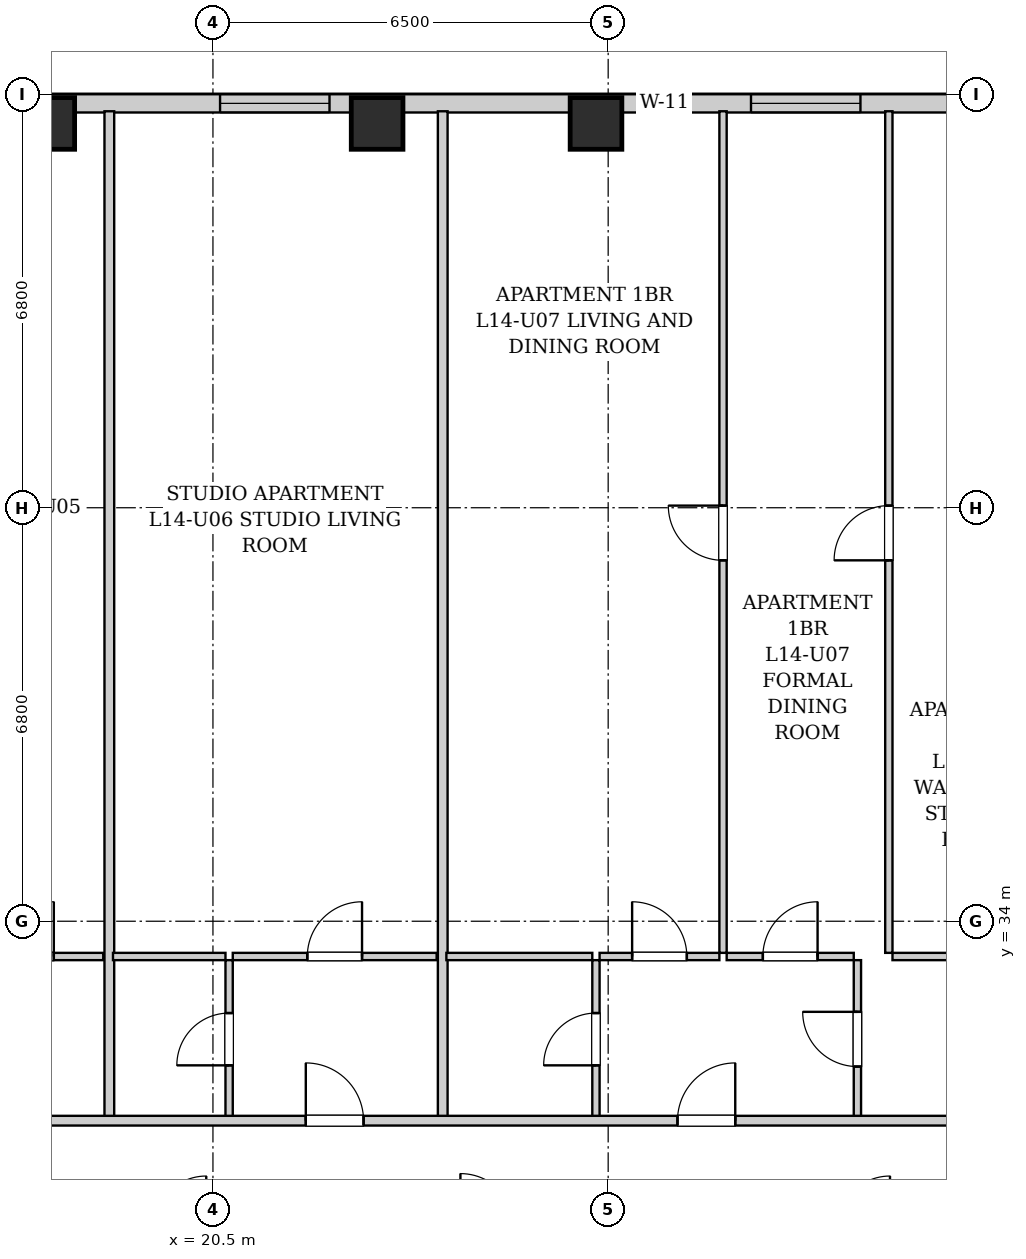
"""IFC4 building model, lengths in metres.
Left out: names, types, materials, properties, quantities, classifications, styles, units other than length and angle.
Written with IfcOpenShell. Run it as: python <this file> out.ifc"""

import sys

from ifc_helpers import new_model, si_unit, direction, frame, frame_2d, origin, origin_2d, place, context, subcontext, project, spatial, rectangle, extrude, element, fill, save


model = new_model("IFC4")
c1 = context("Model", 3, precision=1e-05, world=origin(), true_north=direction((0.0, 1.0)))
c2 = subcontext(c1, "Body", "Model", "MODEL_VIEW")
j1 = project(units=[si_unit("LENGTHUNIT", "METRE"), si_unit("PLANEANGLEUNIT", "RADIAN")], contexts=[c1])
p1 = place(None, origin())
s1 = spatial("IfcSite", under=j1, at=p1, CompositionType="ELEMENT")
p2 = place(p1, origin())
s2 = spatial("IfcBuilding", under=s1, at=p2, CompositionType="ELEMENT")
p3 = place(p2, frame((0.0, 0.0, 54.6)))
s3 = spatial("IfcBuildingStorey", under=s2, at=p3, CompositionType="ELEMENT", Elevation=54.6)
for number, where, z_axis, x_axis in (
    (1, (17.8, 47.12, 0.0), (0.0, 0.0, 1.0), (1.0, 0.0, 0.0)),
    (2, (23.2, 47.12, 0.0), (0.0, 0.0, 1.0), (1.0, 0.0, 0.0)),
    (3, (26.8, 47.12, 0.0), (0.0, 0.0, 1.0), (1.0, 0.0, 0.0)),
):
    element("IfcColumn", number, at=place(p3, frame(where, z_axis=z_axis, x_axis=x_axis)), inside=s3, PredefinedType="COLUMN", context=c2, shape_type="SweptSolid", body=[
        extrude(rectangle(XDim=0.85, YDim=0.85, at=origin_2d()), origin(), (0.0, 0.0, 1.0), 3.2),
    ])
p4 = place(p3, frame((10.0, 47.45, 0.0), z_axis=(0.0, 0.0, 1.0), x_axis=(1.0, 0.0, 0.0)))
e4 = element("IfcWall", 4, at=p4, inside=s3, PredefinedType="SOLIDWALL", context=c2, shape_type="SweptSolid", body=[
    extrude(rectangle(XDim=27.55, YDim=0.3, at=frame_2d((13.775, 0.0))), origin(), (0.0, 0.0, 1.0), 1.975),
])
p5 = place(p4, frame((1.735, 0.0, 0.55)))
e5 = element("IfcOpeningElement", 5, at=p5, cuts=e4, PredefinedType="OPENING", context=c2, shape_type="SweptSolid", body=[
    extrude(rectangle(XDim=1.8, YDim=1.2, at=frame_2d((0.9, 0.6))), frame((0.0, 0.16, 0.0), z_axis=(0.0, -1.0, 0.0), x_axis=(1.0, 0.0, 0.0)), (0.0, 0.0, 1.0), 0.32),
])
p6 = place(p4, frame((5.415, 0.0, 0.55)))
e6 = element("IfcOpeningElement", 6, at=p6, cuts=e4, PredefinedType="OPENING", context=c2, shape_type="SweptSolid", body=[
    extrude(rectangle(XDim=1.8, YDim=1.2, at=frame_2d((0.9, 0.6))), frame((0.0, 0.16, 0.0), z_axis=(0.0, -1.0, 0.0), x_axis=(1.0, 0.0, 0.0)), (0.0, 0.0, 1.0), 0.32),
])
p7 = place(p4, frame((10.617, 0.0, 0.55)))
e7 = element("IfcOpeningElement", 7, at=p7, cuts=e4, PredefinedType="OPENING", context=c2, shape_type="SweptSolid", body=[
    extrude(rectangle(XDim=1.8, YDim=1.2, at=frame_2d((0.9, 0.6))), frame((0.0, 0.16, 0.0), z_axis=(0.0, -1.0, 0.0), x_axis=(1.0, 0.0, 0.0)), (0.0, 0.0, 1.0), 0.32),
])
p8 = place(p4, frame((17.5, 0.0, 0.55)))
e8 = element("IfcOpeningElement", 8, at=p8, cuts=e4, PredefinedType="OPENING", context=c2, shape_type="SweptSolid", body=[
    extrude(rectangle(XDim=0.85, YDim=1.2, at=frame_2d((0.425, 0.6))), frame((0.0, 0.16, 0.0), z_axis=(0.0, -1.0, 0.0), x_axis=(1.0, 0.0, 0.0)), (0.0, 0.0, 1.0), 0.32),
])
p9 = place(p4, frame((19.349, 0.0, 0.55)))
e9 = element("IfcOpeningElement", 9, at=p9, cuts=e4, PredefinedType="OPENING", context=c2, shape_type="SweptSolid", body=[
    extrude(rectangle(XDim=1.8, YDim=1.2, at=frame_2d((0.9, 0.6))), frame((0.0, 0.16, 0.0), z_axis=(0.0, -1.0, 0.0), x_axis=(1.0, 0.0, 0.0)), (0.0, 0.0, 1.0), 0.32),
])
p10 = place(p4, frame((24.769, 0.0, 0.55)))
e10 = element("IfcOpeningElement", 10, at=p10, cuts=e4, PredefinedType="OPENING", context=c2, shape_type="SweptSolid", body=[
    extrude(rectangle(XDim=1.8, YDim=1.2, at=frame_2d((0.9, 0.6))), frame((0.0, 0.16, 0.0), z_axis=(0.0, -1.0, 0.0), x_axis=(1.0, 0.0, 0.0)), (0.0, 0.0, 1.0), 0.32),
])
p11 = place(p3, frame((16.17, 33.42, 0.0), z_axis=(0.0, 0.0, 1.0), x_axis=(1.0, 0.0, 0.0)))
e11 = element("IfcWall", 11, at=p11, inside=s3, PredefinedType="PARTITIONING", context=c2, shape_type="SweptSolid", body=[
    extrude(rectangle(XDim=2.526, YDim=0.12, at=frame_2d((1.263, 0.0))), origin(), (0.0, 0.0, 1.0), 2.94),
])
p12 = place(p11, frame((0.813, 0.0, 0.0)))
e12 = element("IfcOpeningElement", 12, at=p12, cuts=e11, PredefinedType="OPENING", context=c2, shape_type="SweptSolid", body=[
    extrude(rectangle(XDim=0.9, YDim=2.05, at=frame_2d((0.45, 1.025))), frame((0.0, 0.07, 0.0), z_axis=(0.0, -1.0, 0.0), x_axis=(1.0, 0.0, 0.0)), (0.0, 0.0, 1.0), 0.14),
])
p13 = place(p3, frame((18.796, 30.76, 0.0), z_axis=(0.0, 0.0, 1.0), x_axis=(0.0, 1.0, 0.0)))
e13 = element("IfcWall", 13, at=p13, inside=s3, PredefinedType="PARTITIONING", context=c2, shape_type="SweptSolid", body=[
    extrude(rectangle(XDim=16.56, YDim=0.16, at=frame_2d((8.28, 0.0))), origin(), (0.0, 0.0, 1.0), 2.94),
])
p14 = place(p3, frame((20.766, 30.76, 0.0), z_axis=(0.0, 0.0, 1.0), x_axis=(0.0, 1.0, 0.0)))
e14 = element("IfcWall", 14, at=p14, inside=s3, PredefinedType="PARTITIONING", context=c2, shape_type="SweptSolid", body=[
    extrude(rectangle(XDim=2.6, YDim=0.12, at=frame_2d((1.3, 0.0))), origin(), (0.0, 0.0, 1.0), 2.94),
])
p15 = place(p14, frame((0.87, 0.0, 0.0)))
e15 = element("IfcOpeningElement", 15, at=p15, cuts=e14, PredefinedType="OPENING", context=c2, shape_type="SweptSolid", body=[
    extrude(rectangle(XDim=0.86, YDim=2.05, at=frame_2d((0.43, 1.025))), frame((0.0, 0.07, 0.0), z_axis=(0.0, -1.0, 0.0), x_axis=(1.0, 0.0, 0.0)), (0.0, 0.0, 1.0), 0.14),
])
p16 = place(p3, frame((18.856, 33.42, 0.0), z_axis=(0.0, 0.0, 1.0), x_axis=(1.0, 0.0, 0.0)))
e16 = element("IfcWall", 16, at=p16, inside=s3, PredefinedType="PARTITIONING", context=c2, shape_type="SweptSolid", body=[
    extrude(rectangle(XDim=1.85, YDim=0.12, at=frame_2d((0.925, 0.0))), origin(), (0.0, 0.0, 1.0), 2.94),
])
p17 = place(p3, frame((20.826, 33.42, 0.0), z_axis=(0.0, 0.0, 1.0), x_axis=(1.0, 0.0, 0.0)))
e17 = element("IfcWall", 17, at=p17, inside=s3, PredefinedType="PARTITIONING", context=c2, shape_type="SweptSolid", body=[
    extrude(rectangle(XDim=3.353, YDim=0.12, at=frame_2d((1.677, 0.0))), origin(), (0.0, 0.0, 1.0), 2.94),
])
p18 = place(p17, frame((1.226, 0.0, 0.0)))
e18 = element("IfcOpeningElement", 18, at=p18, cuts=e17, PredefinedType="OPENING", context=c2, shape_type="SweptSolid", body=[
    extrude(rectangle(XDim=0.9, YDim=2.05, at=frame_2d((0.45, 1.025))), frame((0.0, 0.07, 0.0), z_axis=(0.0, -1.0, 0.0), x_axis=(1.0, 0.0, 0.0)), (0.0, 0.0, 1.0), 0.14),
])
p19 = place(p3, frame((24.279, 30.76, 0.0), z_axis=(0.0, 0.0, 1.0), x_axis=(0.0, 1.0, 0.0)))
e19 = element("IfcWall", 19, at=p19, inside=s3, PredefinedType="PARTITIONING", context=c2, shape_type="SweptSolid", body=[
    extrude(rectangle(XDim=16.56, YDim=0.16, at=frame_2d((8.28, 0.0))), origin(), (0.0, 0.0, 1.0), 2.94),
])
p20 = place(p3, frame((26.799, 30.76, 0.0), z_axis=(0.0, 0.0, 1.0), x_axis=(0.0, 1.0, 0.0)))
e20 = element("IfcWall", 20, at=p20, inside=s3, PredefinedType="PARTITIONING", context=c2, shape_type="SweptSolid", body=[
    extrude(rectangle(XDim=2.6, YDim=0.12, at=frame_2d((1.3, 0.0))), origin(), (0.0, 0.0, 1.0), 2.94),
])
p21 = place(p20, frame((0.87, 0.0, 0.0)))
e21 = element("IfcOpeningElement", 21, at=p21, cuts=e20, PredefinedType="OPENING", context=c2, shape_type="SweptSolid", body=[
    extrude(rectangle(XDim=0.86, YDim=2.05, at=frame_2d((0.43, 1.025))), frame((0.0, 0.07, 0.0), z_axis=(0.0, -1.0, 0.0), x_axis=(1.0, 0.0, 0.0)), (0.0, 0.0, 1.0), 0.14),
])
p22 = place(p3, frame((24.339, 33.42, 0.0), z_axis=(0.0, 0.0, 1.0), x_axis=(1.0, 0.0, 0.0)))
e22 = element("IfcWall", 22, at=p22, inside=s3, PredefinedType="PARTITIONING", context=c2, shape_type="SweptSolid", body=[
    extrude(rectangle(XDim=2.4, YDim=0.12, at=frame_2d((1.2, 0.0))), origin(), (0.0, 0.0, 1.0), 2.94),
])
p23 = place(p3, frame((31.099, 30.76, 0.0), z_axis=(0.0, 0.0, 1.0), x_axis=(0.0, 1.0, 0.0)))
e23 = element("IfcWall", 23, at=p23, inside=s3, PredefinedType="PARTITIONING", context=c2, shape_type="SweptSolid", body=[
    extrude(rectangle(XDim=2.6, YDim=0.12, at=frame_2d((1.3, 0.0))), origin(), (0.0, 0.0, 1.0), 2.94),
])
p24 = place(p23, frame((0.85, 0.0, 0.0)))
e24 = element("IfcOpeningElement", 24, at=p24, cuts=e23, PredefinedType="OPENING", context=c2, shape_type="SweptSolid", body=[
    extrude(rectangle(XDim=0.9, YDim=2.05, at=frame_2d((0.45, 1.025))), frame((0.0, 0.07, 0.0), z_axis=(0.0, -1.0, 0.0), x_axis=(1.0, 0.0, 0.0)), (0.0, 0.0, 1.0), 0.14),
])
p25 = place(p3, frame((26.859, 33.42, 0.0), z_axis=(0.0, 0.0, 1.0), x_axis=(1.0, 0.0, 0.0)))
e25 = element("IfcWall", 25, at=p25, inside=s3, PredefinedType="PARTITIONING", context=c2, shape_type="SweptSolid", body=[
    extrude(rectangle(XDim=1.97, YDim=0.12, at=frame_2d((0.985, 0.0))), origin(), (0.0, 0.0, 1.0), 2.94),
])
p26 = place(p25, frame((0.535, 0.0, 0.0)))
e26 = element("IfcOpeningElement", 26, at=p26, cuts=e25, PredefinedType="OPENING", context=c2, shape_type="SweptSolid", body=[
    extrude(rectangle(XDim=0.9, YDim=2.05, at=frame_2d((0.45, 1.025))), frame((0.0, 0.07, 0.0), z_axis=(0.0, -1.0, 0.0), x_axis=(1.0, 0.0, 0.0)), (0.0, 0.0, 1.0), 0.14),
])
p27 = place(p3, frame((28.949, 33.42, 0.0), z_axis=(0.0, 0.0, 1.0), x_axis=(1.0, 0.0, 0.0)))
e27 = element("IfcWall", 27, at=p27, inside=s3, PredefinedType="PARTITIONING", context=c2, shape_type="SweptSolid", body=[
    extrude(rectangle(XDim=2.09, YDim=0.12, at=frame_2d((1.045, 0.0))), origin(), (0.0, 0.0, 1.0), 2.94),
])
p28 = place(p27, frame((0.595, 0.0, 0.0)))
e28 = element("IfcOpeningElement", 28, at=p28, cuts=e27, PredefinedType="OPENING", context=c2, shape_type="SweptSolid", body=[
    extrude(rectangle(XDim=0.9, YDim=2.05, at=frame_2d((0.45, 1.025))), frame((0.0, 0.07, 0.0), z_axis=(0.0, -1.0, 0.0), x_axis=(1.0, 0.0, 0.0)), (0.0, 0.0, 1.0), 0.14),
])
p29 = place(p3, frame((31.676, 33.42, 0.0), z_axis=(0.0, 0.0, 1.0), x_axis=(1.0, 0.0, 0.0)))
e29 = element("IfcWall", 29, at=p29, inside=s3, PredefinedType="PARTITIONING", context=c2, shape_type="SweptSolid", body=[
    extrude(rectangle(XDim=2.752, YDim=0.12, at=frame_2d((1.376, 0.0))), origin(), (0.0, 0.0, 1.0), 2.94),
])
p30 = place(p29, frame((0.926, 0.0, 0.0)))
e30 = element("IfcOpeningElement", 30, at=p30, cuts=e29, PredefinedType="OPENING", context=c2, shape_type="SweptSolid", body=[
    extrude(rectangle(XDim=0.9, YDim=2.05, at=frame_2d((0.45, 1.025))), frame((0.0, 0.07, 0.0), z_axis=(0.0, -1.0, 0.0), x_axis=(1.0, 0.0, 0.0)), (0.0, 0.0, 1.0), 0.14),
])
p31 = place(p3, frame((28.889, 33.48, 0.0), z_axis=(0.0, 0.0, 1.0), x_axis=(0.0, 1.0, 0.0)))
e31 = element("IfcWall", 31, at=p31, inside=s3, PredefinedType="PARTITIONING", context=c2, shape_type="SweptSolid", body=[
    extrude(rectangle(XDim=13.84, YDim=0.12, at=frame_2d((6.92, 0.0))), origin(), (0.0, 0.0, 1.0), 2.94),
])
p32 = place(p31, frame((6.455, 0.0, 0.0)))
e32 = element("IfcOpeningElement", 32, at=p32, cuts=e31, PredefinedType="OPENING", context=c2, shape_type="SweptSolid", body=[
    extrude(rectangle(XDim=0.9, YDim=2.05, at=frame_2d((0.45, 1.025))), frame((0.0, 0.07, 0.0), z_axis=(0.0, -1.0, 0.0), x_axis=(1.0, 0.0, 0.0)), (0.0, 0.0, 1.0), 0.14),
])
p33 = place(p3, frame((31.616, 33.48, 0.0), z_axis=(0.0, 0.0, 1.0), x_axis=(0.0, 1.0, 0.0)))
e33 = element("IfcWall", 33, at=p33, inside=s3, PredefinedType="PARTITIONING", context=c2, shape_type="SweptSolid", body=[
    extrude(rectangle(XDim=13.84, YDim=0.12, at=frame_2d((6.92, 0.0))), origin(), (0.0, 0.0, 1.0), 2.94),
])
p34 = place(p33, frame((6.455, 0.0, 0.0)))
e34 = element("IfcOpeningElement", 34, at=p34, cuts=e33, PredefinedType="OPENING", context=c2, shape_type="SweptSolid", body=[
    extrude(rectangle(XDim=0.9, YDim=2.05, at=frame_2d((0.45, 1.025))), frame((0.0, 0.07, 0.0), z_axis=(0.0, -1.0, 0.0), x_axis=(1.0, 0.0, 0.0)), (0.0, 0.0, 1.0), 0.14),
])
p35 = place(p3, frame((10.05, 30.72, 0.0), z_axis=(0.0, 0.0, 1.0), x_axis=(1.0, 0.0, 0.0)))
e35 = element("IfcWall", 35, at=p35, inside=s3, PredefinedType="PARTITIONING", context=c2, shape_type="SweptSolid", body=[
    extrude(rectangle(XDim=33.9, YDim=0.16, at=frame_2d((16.95, 0.0))), origin(), (0.0, 0.0, 1.0), 2.94),
])
p36 = place(p35, frame((3.8, 0.0, 0.0)))
e36 = element("IfcOpeningElement", 36, at=p36, cuts=e35, PredefinedType="OPENING", context=c2, shape_type="SweptSolid", body=[
    extrude(rectangle(XDim=0.95, YDim=2.1, at=frame_2d((0.475, 1.05))), frame((0.0, 0.09, 0.0), z_axis=(0.0, -1.0, 0.0), x_axis=(1.0, 0.0, 0.0)), (0.0, 0.0, 1.0), 0.18),
])
p37 = place(p35, frame((11.977, 0.0, 0.0)))
e37 = element("IfcOpeningElement", 37, at=p37, cuts=e35, PredefinedType="OPENING", context=c2, shape_type="SweptSolid", body=[
    extrude(rectangle(XDim=0.95, YDim=2.1, at=frame_2d((0.475, 1.05))), frame((0.0, 0.09, 0.0), z_axis=(0.0, -1.0, 0.0), x_axis=(1.0, 0.0, 0.0)), (0.0, 0.0, 1.0), 0.18),
])
p38 = place(p35, frame((18.09, 0.0, 0.0)))
e38 = element("IfcOpeningElement", 38, at=p38, cuts=e35, PredefinedType="OPENING", context=c2, shape_type="SweptSolid", body=[
    extrude(rectangle(XDim=0.95, YDim=2.1, at=frame_2d((0.475, 1.05))), frame((0.0, 0.09, 0.0), z_axis=(0.0, -1.0, 0.0), x_axis=(1.0, 0.0, 0.0)), (0.0, 0.0, 1.0), 0.18),
])
p39 = place(p35, frame((30.956, 0.0, 0.0)))
e39 = element("IfcOpeningElement", 39, at=p39, cuts=e35, PredefinedType="OPENING", context=c2, shape_type="SweptSolid", body=[
    extrude(rectangle(XDim=0.95, YDim=2.1, at=frame_2d((0.475, 1.05))), frame((0.0, 0.09, 0.0), z_axis=(0.0, -1.0, 0.0), x_axis=(1.0, 0.0, 0.0)), (0.0, 0.0, 1.0), 0.18),
])
p40 = place(p12, origin())
e40 = element("IfcDoor", 40, at=p40, inside=s3, OperationType="SINGLE_SWING_RIGHT", PredefinedType="DOOR", context=c2, shape_type="SweptSolid", body=[
    extrude(rectangle(XDim=0.9, YDim=2.05, at=frame_2d((0.45, 1.025))), frame((0.0, 0.025, 0.0), z_axis=(0.0, -1.0, 0.0), x_axis=(1.0, 0.0, 0.0)), (0.0, 0.0, 1.0), 0.05),
])
fill(e12, e40)
p41 = place(p15, origin())
e41 = element("IfcDoor", 41, at=p41, inside=s3, OperationType="SINGLE_SWING_LEFT", PredefinedType="DOOR", context=c2, shape_type="SweptSolid", body=[
    extrude(rectangle(XDim=0.86, YDim=2.05, at=frame_2d((0.43, 1.025))), frame((0.0, 0.025, 0.0), z_axis=(0.0, -1.0, 0.0), x_axis=(1.0, 0.0, 0.0)), (0.0, 0.0, 1.0), 0.05),
])
fill(e15, e41)
p42 = place(p18, origin())
e42 = element("IfcDoor", 42, at=p42, inside=s3, OperationType="SINGLE_SWING_RIGHT", PredefinedType="DOOR", context=c2, shape_type="SweptSolid", body=[
    extrude(rectangle(XDim=0.9, YDim=2.05, at=frame_2d((0.45, 1.025))), frame((0.0, 0.025, 0.0), z_axis=(0.0, -1.0, 0.0), x_axis=(1.0, 0.0, 0.0)), (0.0, 0.0, 1.0), 0.05),
])
fill(e18, e42)
p43 = place(p21, origin())
e43 = element("IfcDoor", 43, at=p43, inside=s3, OperationType="SINGLE_SWING_LEFT", PredefinedType="DOOR", context=c2, shape_type="SweptSolid", body=[
    extrude(rectangle(XDim=0.86, YDim=2.05, at=frame_2d((0.43, 1.025))), frame((0.0, 0.025, 0.0), z_axis=(0.0, -1.0, 0.0), x_axis=(1.0, 0.0, 0.0)), (0.0, 0.0, 1.0), 0.05),
])
fill(e21, e43)
p44 = place(p24, origin())
e44 = element("IfcDoor", 44, at=p44, inside=s3, OperationType="SINGLE_SWING_RIGHT", PredefinedType="DOOR", context=c2, shape_type="SweptSolid", body=[
    extrude(rectangle(XDim=0.9, YDim=2.05, at=frame_2d((0.45, 1.025))), frame((0.0, 0.025, 0.0), z_axis=(0.0, -1.0, 0.0), x_axis=(1.0, 0.0, 0.0)), (0.0, 0.0, 1.0), 0.05),
])
fill(e24, e44)
p45 = place(p26, origin())
e45 = element("IfcDoor", 45, at=p45, inside=s3, OperationType="SINGLE_SWING_LEFT", PredefinedType="DOOR", context=c2, shape_type="SweptSolid", body=[
    extrude(rectangle(XDim=0.9, YDim=2.05, at=frame_2d((0.45, 1.025))), frame((0.0, 0.025, 0.0), z_axis=(0.0, -1.0, 0.0), x_axis=(1.0, 0.0, 0.0)), (0.0, 0.0, 1.0), 0.05),
])
fill(e26, e45)
p46 = place(p28, origin())
e46 = element("IfcDoor", 46, at=p46, inside=s3, OperationType="SINGLE_SWING_RIGHT", PredefinedType="DOOR", context=c2, shape_type="SweptSolid", body=[
    extrude(rectangle(XDim=0.9, YDim=2.05, at=frame_2d((0.45, 1.025))), frame((0.0, 0.025, 0.0), z_axis=(0.0, -1.0, 0.0), x_axis=(1.0, 0.0, 0.0)), (0.0, 0.0, 1.0), 0.05),
])
fill(e28, e46)
p47 = place(p32, origin())
e47 = element("IfcDoor", 47, at=p47, inside=s3, OperationType="SINGLE_SWING_RIGHT", PredefinedType="DOOR", context=c2, shape_type="SweptSolid", body=[
    extrude(rectangle(XDim=0.9, YDim=2.05, at=frame_2d((0.45, 1.025))), frame((0.0, 0.025, 0.0), z_axis=(0.0, -1.0, 0.0), x_axis=(1.0, 0.0, 0.0)), (0.0, 0.0, 1.0), 0.05),
])
fill(e32, e47)
p48 = place(p34, origin())
e48 = element("IfcDoor", 48, at=p48, inside=s3, OperationType="SINGLE_SWING_LEFT", PredefinedType="DOOR", context=c2, shape_type="SweptSolid", body=[
    extrude(rectangle(XDim=0.9, YDim=2.05, at=frame_2d((0.45, 1.025))), frame((0.0, 0.025, 0.0), z_axis=(0.0, -1.0, 0.0), x_axis=(1.0, 0.0, 0.0)), (0.0, 0.0, 1.0), 0.05),
])
fill(e34, e48)
p49 = place(p37, origin())
e49 = element("IfcDoor", 49, at=p49, inside=s3, OperationType="SINGLE_SWING_LEFT", PredefinedType="DOOR", context=c2, shape_type="SweptSolid", body=[
    extrude(rectangle(XDim=0.95, YDim=2.1, at=frame_2d((0.475, 1.05))), frame((0.0, 0.025, 0.0), z_axis=(0.0, -1.0, 0.0), x_axis=(1.0, 0.0, 0.0)), (0.0, 0.0, 1.0), 0.05),
])
fill(e37, e49)
p50 = place(p38, origin())
e50 = element("IfcDoor", 50, at=p50, inside=s3, OperationType="SINGLE_SWING_RIGHT", PredefinedType="DOOR", context=c2, shape_type="SweptSolid", body=[
    extrude(rectangle(XDim=0.95, YDim=2.1, at=frame_2d((0.475, 1.05))), frame((0.0, 0.025, 0.0), z_axis=(0.0, -1.0, 0.0), x_axis=(1.0, 0.0, 0.0)), (0.0, 0.0, 1.0), 0.05),
])
fill(e38, e50)
p51 = place(p7, origin())
e51 = element("IfcWindow", 51, at=p51, inside=s3, PartitioningType="DOUBLE_PANEL_VERTICAL", PredefinedType="WINDOW", context=c2, shape_type="SweptSolid", body=[
    extrude(rectangle(XDim=1.8, YDim=1.2, at=frame_2d((0.9, 0.6))), frame((0.0, 0.03, 0.0), z_axis=(0.0, -1.0, 0.0), x_axis=(1.0, 0.0, 0.0)), (0.0, 0.0, 1.0), 0.06),
])
fill(e7, e51)
p52 = place(p8, origin())
e52 = element("IfcWindow", 52, at=p52, inside=s3, PartitioningType="SINGLE_PANEL", PredefinedType="WINDOW", context=c2, shape_type="SweptSolid", body=[
    extrude(rectangle(XDim=0.85, YDim=1.2, at=frame_2d((0.425, 0.6))), frame((0.0, 0.03, 0.0), z_axis=(0.0, -1.0, 0.0), x_axis=(1.0, 0.0, 0.0)), (0.0, 0.0, 1.0), 0.06),
])
fill(e8, e52)
p53 = place(p9, origin())
e53 = element("IfcWindow", 53, at=p53, inside=s3, PartitioningType="DOUBLE_PANEL_VERTICAL", PredefinedType="WINDOW", context=c2, shape_type="SweptSolid", body=[
    extrude(rectangle(XDim=1.8, YDim=1.2, at=frame_2d((0.9, 0.6))), frame((0.0, 0.03, 0.0), z_axis=(0.0, -1.0, 0.0), x_axis=(1.0, 0.0, 0.0)), (0.0, 0.0, 1.0), 0.06),
])
fill(e9, e53)
save(model, sys.argv[1])
